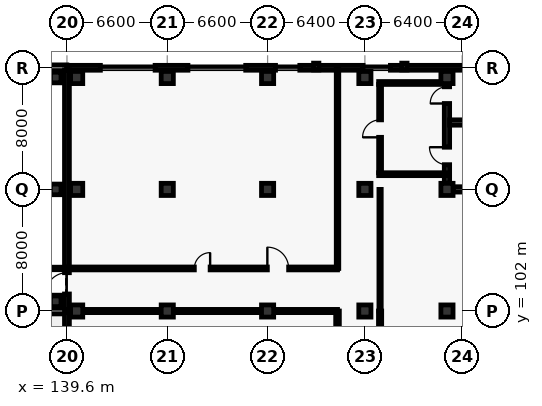
"""IFC4 building model, lengths in metres.
Left out: names, types, materials, properties, quantities, classifications, styles, units other than length and angle.
Written with IfcOpenShell. Run it as: python <this file> out.ifc"""

import sys

from ifc_helpers import new_model, si_unit, direction, frame, frame_2d, origin, origin_2d, place, context, subcontext, project, spatial, rectangle, extrude, element, fill, save


model = new_model("IFC4")
c1 = context("Model", 3, precision=1e-05, world=origin(), true_north=direction((0.0, 1.0)))
c2 = subcontext(c1, "Body", "Model", "MODEL_VIEW")
j1 = project(units=[si_unit("LENGTHUNIT", "METRE"), si_unit("PLANEANGLEUNIT", "RADIAN")], contexts=[c1])
p1 = place(None, origin())
s1 = spatial("IfcSite", under=j1, at=p1, CompositionType="ELEMENT")
p2 = place(p1, origin())
s2 = spatial("IfcBuilding", under=s1, at=p2, CompositionType="ELEMENT")
p3 = place(p2, origin())
s3 = spatial("IfcBuildingStorey", under=s2, at=p3, CompositionType="ELEMENT", Elevation=0.0)
for number, where, z_axis, x_axis in (
    (1, (138.86, 102.64, 0.0), (0.0, 0.0, 1.0), (1.0, 0.0, 0.0)),
    (2, (138.86, 110.0, 0.0), (0.0, 0.0, 1.0), (1.0, 0.0, 0.0)),
    (3, (138.86, 117.36, 0.0), (0.0, 0.0, 1.0), (1.0, 0.0, 0.0)),
):
    element("IfcColumn", number, at=place(p3, frame(where, z_axis=z_axis, x_axis=x_axis)), inside=s3, PredefinedType="COLUMN", context=c2, shape_type="SweptSolid", body=[
        extrude(rectangle(XDim=0.7, YDim=0.7, at=origin_2d()), origin(), (0.0, 0.0, 1.0), 5.4),
    ])
for number, where, z_axis, x_axis in (
    (4, (140.24, 102.0, 0.0), (0.0, 0.0, 1.0), (1.0, 0.0, 0.0)),
    (5, (140.24, 110.0, 0.0), (0.0, 0.0, 1.0), (1.0, 0.0, 0.0)),
    (6, (140.24, 117.36, 0.0), (0.0, 0.0, 1.0), (1.0, 0.0, 0.0)),
    (7, (146.2, 102.0, 0.0), (0.0, 0.0, 1.0), (1.0, 0.0, 0.0)),
    (8, (146.2, 110.0, 0.0), (0.0, 0.0, 1.0), (1.0, 0.0, 0.0)),
    (9, (146.2, 117.36, 0.0), (0.0, 0.0, 1.0), (1.0, 0.0, 0.0)),
    (10, (152.8, 102.0, 0.0), (0.0, 0.0, 1.0), (1.0, 0.0, 0.0)),
    (11, (152.8, 110.0, 0.0), (0.0, 0.0, 1.0), (1.0, 0.0, 0.0)),
    (12, (152.8, 117.36, 0.0), (0.0, 0.0, 1.0), (1.0, 0.0, 0.0)),
    (13, (159.2, 102.0, 0.0), (0.0, 0.0, 1.0), (1.0, 0.0, 0.0)),
    (14, (159.2, 110.0, 0.0), (0.0, 0.0, 1.0), (1.0, 0.0, 0.0)),
    (15, (159.2, 117.36, 0.0), (0.0, 0.0, 1.0), (1.0, 0.0, 0.0)),
    (16, (164.6, 102.0, 0.0), (0.0, 0.0, 1.0), (1.0, 0.0, 0.0)),
    (17, (164.6, 110.0, 0.0), (0.0, 0.0, 1.0), (1.0, 0.0, 0.0)),
    (18, (164.6, 117.36, 0.0), (0.0, 0.0, 1.0), (1.0, 0.0, 0.0)),
):
    element("IfcColumn", number, at=place(p3, frame(where, z_axis=z_axis, x_axis=x_axis)), inside=s3, PredefinedType="COLUMN", context=c2, shape_type="SweptSolid", body=[
        extrude(rectangle(XDim=0.8, YDim=0.8, at=origin_2d()), origin(), (0.0, 0.0, 1.0), 5.4),
    ])
for number, where, z_axis, x_axis in (
    (19, (156.0, 118.08, 0.0), (0.0, 0.0, 1.0), (0.0, 1.0, 0.0)),
    (20, (161.8, 118.08, 0.0), (0.0, 0.0, 1.0), (0.0, 1.0, 0.0)),
):
    element("IfcColumn", number, at=place(p3, frame(where, z_axis=z_axis, x_axis=x_axis)), inside=s3, PredefinedType="PILASTER", context=c2, shape_type="SweptSolid", body=[
        extrude(rectangle(XDim=0.35, YDim=0.45, at=origin_2d()), origin(), (0.0, 0.0, 1.0), 5.4),
    ])
p4 = place(p3, frame((94.8, 118.0, 0.0), z_axis=(0.0, 0.0, 1.0), x_axis=(1.0, 0.0, 0.0)))
e21 = element("IfcWall", 21, at=p4, inside=s3, PredefinedType="SOLIDWALL", context=c2, shape_type="SweptSolid", body=[
    extrude(rectangle(XDim=44.795, YDim=0.38, at=frame_2d((22.397, 0.0))), origin(), (0.0, 0.0, 1.0), 5.12),
])
p5 = place(p4, frame((0.75, 0.0, 0.9)))
e22 = element("IfcOpeningElement", 22, at=p5, cuts=e21, PredefinedType="OPENING", context=c2, shape_type="SweptSolid", body=[
    extrude(rectangle(XDim=2.6, YDim=2.35, at=frame_2d((1.3, 1.175))), frame((0.0, 0.2, 0.0), z_axis=(0.0, -1.0, 0.0), x_axis=(1.0, 0.0, 0.0)), (0.0, 0.0, 1.0), 0.4),
])
p6 = place(p4, frame((8.3, 0.0, 0.9)))
e23 = element("IfcOpeningElement", 23, at=p6, cuts=e21, PredefinedType="OPENING", context=c2, shape_type="SweptSolid", body=[
    extrude(rectangle(XDim=2.7, YDim=2.35, at=frame_2d((1.35, 1.175))), frame((0.0, 0.2, 0.0), z_axis=(0.0, -1.0, 0.0), x_axis=(1.0, 0.0, 0.0)), (0.0, 0.0, 1.0), 0.4),
])
p7 = place(p4, frame((15.9, 0.0, 0.9)))
e24 = element("IfcOpeningElement", 24, at=p7, cuts=e21, PredefinedType="OPENING", context=c2, shape_type="SweptSolid", body=[
    extrude(rectangle(XDim=2.8, YDim=2.4, at=frame_2d((1.4, 1.2))), frame((0.0, 0.2, 0.0), z_axis=(0.0, -1.0, 0.0), x_axis=(1.0, 0.0, 0.0)), (0.0, 0.0, 1.0), 0.4),
])
p8 = place(p4, frame((22.75, 0.0, 0.9)))
e25 = element("IfcOpeningElement", 25, at=p8, cuts=e21, PredefinedType="OPENING", context=c2, shape_type="SweptSolid", body=[
    extrude(rectangle(XDim=2.9, YDim=2.4, at=frame_2d((1.45, 1.2))), frame((0.0, 0.2, 0.0), z_axis=(0.0, -1.0, 0.0), x_axis=(1.0, 0.0, 0.0)), (0.0, 0.0, 1.0), 0.4),
])
p9 = place(p4, frame((30.35, 0.0, 0.9)))
e26 = element("IfcOpeningElement", 26, at=p9, cuts=e21, PredefinedType="OPENING", context=c2, shape_type="SweptSolid", body=[
    extrude(rectangle(XDim=3.0, YDim=2.45, at=frame_2d((1.5, 1.225))), frame((0.0, 0.2, 0.0), z_axis=(0.0, -1.0, 0.0), x_axis=(1.0, 0.0, 0.0)), (0.0, 0.0, 1.0), 0.4),
])
p10 = place(p4, frame((36.45, 0.0, 0.9)))
e27 = element("IfcOpeningElement", 27, at=p10, cuts=e21, PredefinedType="OPENING", context=c2, shape_type="SweptSolid", body=[
    extrude(rectangle(XDim=3.1, YDim=2.45, at=frame_2d((1.55, 1.225))), frame((0.0, 0.2, 0.0), z_axis=(0.0, -1.0, 0.0), x_axis=(1.0, 0.0, 0.0)), (0.0, 0.0, 1.0), 0.4),
])
p11 = place(p3, frame((139.5, 102.0, 0.0), z_axis=(0.0, 0.0, 1.0), x_axis=(-1.0, 0.0, 0.0)))
e28 = element("IfcWall", 28, at=p11, inside=s3, PredefinedType="SOLIDWALL", context=c2, shape_type="SweptSolid", body=[
    extrude(rectangle(XDim=44.7, YDim=0.38, at=frame_2d((22.35, 0.0))), origin(), (0.0, 0.0, 1.0), 5.12),
])
p12 = place(p11, frame((39.7, 0.0, 0.0)))
e29 = element("IfcOpeningElement", 29, at=p12, cuts=e28, PredefinedType="OPENING", context=c2, shape_type="SweptSolid", body=[
    extrude(rectangle(XDim=2.0, YDim=2.5, at=frame_2d((1.0, 1.25))), frame((0.0, 0.2, 0.0), z_axis=(0.0, -1.0, 0.0), x_axis=(1.0, 0.0, 0.0)), (0.0, 0.0, 1.0), 0.4),
])
p13 = place(p11, frame((2.2, 0.0, 0.9)))
e30 = element("IfcOpeningElement", 30, at=p13, cuts=e28, PredefinedType="OPENING", context=c2, shape_type="SweptSolid", body=[
    extrude(rectangle(XDim=3.2, YDim=2.5, at=frame_2d((1.6, 1.25))), frame((0.0, 0.2, 0.0), z_axis=(0.0, -1.0, 0.0), x_axis=(1.0, 0.0, 0.0)), (0.0, 0.0, 1.0), 0.4),
])
p14 = place(p11, frame((9.05, 0.0, 0.9)))
e31 = element("IfcOpeningElement", 31, at=p14, cuts=e28, PredefinedType="OPENING", context=c2, shape_type="SweptSolid", body=[
    extrude(rectangle(XDim=3.3, YDim=2.5, at=frame_2d((1.65, 1.25))), frame((0.0, 0.2, 0.0), z_axis=(0.0, -1.0, 0.0), x_axis=(1.0, 0.0, 0.0)), (0.0, 0.0, 1.0), 0.4),
])
p15 = place(p11, frame((15.9, 0.0, 0.9)))
e32 = element("IfcOpeningElement", 32, at=p15, cuts=e28, PredefinedType="OPENING", context=c2, shape_type="SweptSolid", body=[
    extrude(rectangle(XDim=3.4, YDim=2.55, at=frame_2d((1.7, 1.275))), frame((0.0, 0.2, 0.0), z_axis=(0.0, -1.0, 0.0), x_axis=(1.0, 0.0, 0.0)), (0.0, 0.0, 1.0), 0.4),
])
p16 = place(p11, frame((22.75, 0.0, 0.9)))
e33 = element("IfcOpeningElement", 33, at=p16, cuts=e28, PredefinedType="OPENING", context=c2, shape_type="SweptSolid", body=[
    extrude(rectangle(XDim=3.5, YDim=2.55, at=frame_2d((1.75, 1.275))), frame((0.0, 0.2, 0.0), z_axis=(0.0, -1.0, 0.0), x_axis=(1.0, 0.0, 0.0)), (0.0, 0.0, 1.0), 0.4),
])
p17 = place(p11, frame((29.6, 0.0, 0.9)))
e34 = element("IfcOpeningElement", 34, at=p17, cuts=e28, PredefinedType="OPENING", context=c2, shape_type="SweptSolid", body=[
    extrude(rectangle(XDim=3.6, YDim=2.6, at=frame_2d((1.8, 1.3))), frame((0.0, 0.2, 0.0), z_axis=(0.0, -1.0, 0.0), x_axis=(1.0, 0.0, 0.0)), (0.0, 0.0, 1.0), 0.4),
])
p18 = place(p11, frame((35.0, 0.0, 0.9)))
e35 = element("IfcOpeningElement", 35, at=p18, cuts=e28, PredefinedType="OPENING", context=c2, shape_type="SweptSolid", body=[
    extrude(rectangle(XDim=3.8, YDim=2.6, at=frame_2d((1.9, 1.3))), frame((0.0, 0.2, 0.0), z_axis=(0.0, -1.0, 0.0), x_axis=(1.0, 0.0, 0.0)), (0.0, 0.0, 1.0), 0.4),
])
p19 = place(p3, frame((139.6, 118.0, 0.0), z_axis=(0.0, 0.0, 1.0), x_axis=(1.0, 0.0, 0.0)))
e36 = element("IfcWall", 36, at=p19, inside=s3, PredefinedType="SOLIDWALL", context=c2, shape_type="SweptSolid", body=[
    extrude(rectangle(XDim=32.4, YDim=0.32, at=frame_2d((16.2, 0.0))), origin(), (0.0, 0.0, 1.0), 5.14),
])
p20 = place(p19, frame((28.5, 0.0, 0.0)))
e37 = element("IfcOpeningElement", 37, at=p20, cuts=e36, PredefinedType="OPENING", context=c2, shape_type="SweptSolid", body=[
    extrude(rectangle(XDim=2.0, YDim=2.5, at=frame_2d((1.0, 1.25))), frame((0.0, 0.17, 0.0), z_axis=(0.0, -1.0, 0.0), x_axis=(1.0, 0.0, 0.0)), (0.0, 0.0, 1.0), 0.34),
])
p21 = place(p19, frame((2.2, 0.0, 0.9)))
e38 = element("IfcOpeningElement", 38, at=p21, cuts=e36, PredefinedType="OPENING", context=c2, shape_type="SweptSolid", body=[
    extrude(rectangle(XDim=3.6, YDim=2.6, at=frame_2d((1.8, 1.3))), frame((0.0, 0.17, 0.0), z_axis=(0.0, -1.0, 0.0), x_axis=(1.0, 0.0, 0.0)), (0.0, 0.0, 1.0), 0.34),
])
p22 = place(p19, frame((7.96, 0.0, 0.9)))
e39 = element("IfcOpeningElement", 39, at=p22, cuts=e36, PredefinedType="OPENING", context=c2, shape_type="SweptSolid", body=[
    extrude(rectangle(XDim=3.8, YDim=2.6, at=frame_2d((1.9, 1.3))), frame((0.0, 0.17, 0.0), z_axis=(0.0, -1.0, 0.0), x_axis=(1.0, 0.0, 0.0)), (0.0, 0.0, 1.0), 0.34),
])
p23 = place(p19, frame((13.72, 0.0, 0.9)))
e40 = element("IfcOpeningElement", 40, at=p23, cuts=e36, PredefinedType="OPENING", context=c2, shape_type="SweptSolid", body=[
    extrude(rectangle(XDim=1.6, YDim=1.65, at=frame_2d((0.8, 0.825))), frame((0.0, 0.17, 0.0), z_axis=(0.0, -1.0, 0.0), x_axis=(1.0, 0.0, 0.0)), (0.0, 0.0, 1.0), 0.34),
])
p24 = place(p19, frame((19.48, 0.0, 0.9)))
e41 = element("IfcOpeningElement", 41, at=p24, cuts=e36, PredefinedType="OPENING", context=c2, shape_type="SweptSolid", body=[
    extrude(rectangle(XDim=1.8, YDim=1.65, at=frame_2d((0.9, 0.825))), frame((0.0, 0.17, 0.0), z_axis=(0.0, -1.0, 0.0), x_axis=(1.0, 0.0, 0.0)), (0.0, 0.0, 1.0), 0.34),
])
p25 = place(p3, frame((139.6, 71.74, 0.0), z_axis=(0.0, 0.0, 1.0), x_axis=(0.0, 1.0, 0.0)))
e42 = element("IfcWall", 42, at=p25, inside=s3, PredefinedType="SOLIDWALL", context=c2, shape_type="SweptSolid", body=[
    extrude(rectangle(XDim=46.12, YDim=0.32, at=frame_2d((23.06, 0.0))), origin(), (0.0, 0.0, 1.0), 4.29),
])
p26 = place(p25, frame((31.38, 0.0, 0.0)))
e43 = element("IfcOpeningElement", 43, at=p26, cuts=e42, PredefinedType="OPENING", context=c2, shape_type="SweptSolid", body=[
    extrude(rectangle(XDim=1.4, YDim=2.25, at=frame_2d((0.7, 1.125))), frame((0.0, 0.17, 0.0), z_axis=(0.0, -1.0, 0.0), x_axis=(1.0, 0.0, 0.0)), (0.0, 0.0, 1.0), 0.34),
])
p27 = place(p3, frame((165.002, 110.0, 0.0), z_axis=(0.0, 0.0, 1.0), x_axis=(1.0, 0.0, 0.0)))
e44 = element("IfcWall", 44, at=p27, inside=s3, PredefinedType="SHEAR", context=c2, shape_type="SweptSolid", body=[
    extrude(rectangle(XDim=7.173, YDim=0.35, at=frame_2d((3.586, 0.0))), origin(), (0.0, 0.0, 1.0), 5.14),
])
p28 = place(p3, frame((164.6, 110.402, 0.0), z_axis=(0.0, 0.0, 1.0), x_axis=(0.0, 1.0, 0.0)))
e45 = element("IfcWall", 45, at=p28, inside=s3, PredefinedType="SHEAR", context=c2, shape_type="SweptSolid", body=[
    extrude(rectangle(XDim=7.423, YDim=0.35, at=frame_2d((3.711, 0.0))), origin(), (0.0, 0.0, 1.0), 5.14),
])
p29 = place(p28, frame((5.248, 0.0, 0.0)))
e46 = element("IfcOpeningElement", 46, at=p29, cuts=e45, PredefinedType="OPENING", context=c2, shape_type="SweptSolid", body=[
    extrude(rectangle(XDim=1.1, YDim=2.15, at=frame_2d((0.55, 1.075))), frame((0.0, 0.185, 0.0), z_axis=(0.0, -1.0, 0.0), x_axis=(1.0, 0.0, 0.0)), (0.0, 0.0, 1.0), 0.37),
])
p30 = place(p28, frame((1.223, 0.0, 0.0)))
e47 = element("IfcOpeningElement", 47, at=p30, cuts=e45, PredefinedType="OPENING", context=c2, shape_type="SweptSolid", body=[
    extrude(rectangle(XDim=1.15, YDim=2.2, at=frame_2d((0.575, 1.1))), frame((0.0, 0.185, 0.0), z_axis=(0.0, -1.0, 0.0), x_axis=(1.0, 0.0, 0.0)), (0.0, 0.0, 1.0), 0.37),
])
p31 = place(p3, frame((164.775, 114.4, 0.0), z_axis=(0.0, 0.0, 1.0), x_axis=(1.0, 0.0, 0.0)))
e48 = element("IfcWall", 48, at=p31, inside=s3, PredefinedType="SHEAR", context=c2, shape_type="SweptSolid", body=[
    extrude(rectangle(XDim=7.05, YDim=0.35, at=frame_2d((3.525, 0.0))), origin(), (0.0, 0.0, 1.0), 5.14),
])
p32 = place(p3, frame((160.105, 111.0, 0.0), z_axis=(0.0, 0.0, 1.0), x_axis=(1.0, 0.0, 0.0)))
e49 = element("IfcWall", 49, at=p32, inside=s3, PredefinedType="PARTITIONING", context=c2, shape_type="SweptSolid", body=[
    extrude(rectangle(XDim=4.495, YDim=0.19, at=frame_2d((2.248, 0.0))), origin(), (0.0, 0.0, 1.0), 5.14),
])
p33 = place(p3, frame((160.105, 117.0, 0.0), z_axis=(0.0, 0.0, 1.0), x_axis=(1.0, 0.0, 0.0)))
e50 = element("IfcWall", 50, at=p33, inside=s3, PredefinedType="PARTITIONING", context=c2, shape_type="SweptSolid", body=[
    extrude(rectangle(XDim=4.093, YDim=0.19, at=frame_2d((2.046, 0.0))), origin(), (0.0, 0.0, 1.0), 4.49),
])
p34 = place(p3, frame((160.2, 111.095, 0.0), z_axis=(0.0, 0.0, 1.0), x_axis=(0.0, 1.0, 0.0)))
e51 = element("IfcWall", 51, at=p34, inside=s3, PredefinedType="PARTITIONING", context=c2, shape_type="SweptSolid", body=[
    extrude(rectangle(XDim=5.81, YDim=0.19, at=frame_2d((2.905, 0.0))), origin(), (0.0, 0.0, 1.0), 5.14),
])
p35 = place(p34, frame((2.33, 0.0, 0.0)))
e52 = element("IfcOpeningElement", 52, at=p35, cuts=e51, PredefinedType="OPENING", context=c2, shape_type="SweptSolid", body=[
    extrude(rectangle(XDim=1.15, YDim=2.2, at=frame_2d((0.575, 1.1))), frame((0.0, 0.105, 0.0), z_axis=(0.0, -1.0, 0.0), x_axis=(1.0, 0.0, 0.0)), (0.0, 0.0, 1.0), 0.21),
])
p36 = place(p3, frame((124.8, 104.8, 0.0), z_axis=(0.0, 0.0, 1.0), x_axis=(1.0, 0.0, 0.0)))
e53 = element("IfcWall", 53, at=p36, inside=s3, PredefinedType="PARTITIONING", context=c2, shape_type="SweptSolid", body=[
    extrude(rectangle(XDim=14.7, YDim=0.165, at=frame_2d((7.35, 0.0))), origin(), (0.0, 0.0, 1.0), 5.12),
])
p37 = place(p36, frame((6.88, 0.0, 0.0)))
e54 = element("IfcOpeningElement", 54, at=p37, cuts=e53, PredefinedType="OPENING", context=c2, shape_type="SweptSolid", body=[
    extrude(rectangle(XDim=0.94, YDim=2.15, at=frame_2d((0.47, 1.075))), frame((0.0, 0.093, 0.0), z_axis=(0.0, -1.0, 0.0), x_axis=(1.0, 0.0, 0.0)), (0.0, 0.0, 1.0), 0.185),
])
p38 = place(p3, frame((157.4, 102.0, 0.0), z_axis=(0.0, 0.0, 1.0), x_axis=(-1.0, 0.0, 0.0)))
e55 = element("IfcWall", 55, at=p38, inside=s3, PredefinedType="PARTITIONING", context=c2, shape_type="SweptSolid", body=[
    extrude(rectangle(XDim=17.8, YDim=0.21, at=frame_2d((8.9, 0.0))), origin(), (0.0, 0.0, 1.0), 4.49),
])
p39 = place(p3, frame((139.6, 104.8, 0.0), z_axis=(0.0, 0.0, 1.0), x_axis=(1.0, 0.0, 0.0)))
e56 = element("IfcWall", 56, at=p39, inside=s3, PredefinedType="PARTITIONING", context=c2, shape_type="SweptSolid", body=[
    extrude(rectangle(XDim=17.8, YDim=0.19, at=frame_2d((8.9, 0.0))), origin(), (0.0, 0.0, 1.0), 5.14),
])
p40 = place(p39, frame((8.38, 0.0, 0.0)))
e57 = element("IfcOpeningElement", 57, at=p40, cuts=e56, PredefinedType="OPENING", context=c2, shape_type="SweptSolid", body=[
    extrude(rectangle(XDim=1.04, YDim=2.2, at=frame_2d((0.52, 1.1))), frame((0.0, 0.105, 0.0), z_axis=(0.0, -1.0, 0.0), x_axis=(1.0, 0.0, 0.0)), (0.0, 0.0, 1.0), 0.21),
])
p41 = place(p39, frame((13.184, 0.0, 0.0)))
e58 = element("IfcOpeningElement", 58, at=p41, cuts=e56, PredefinedType="OPENING", context=c2, shape_type="SweptSolid", body=[
    extrude(rectangle(XDim=1.4, YDim=2.25, at=frame_2d((0.7, 1.125))), frame((0.0, 0.105, 0.0), z_axis=(0.0, -1.0, 0.0), x_axis=(1.0, 0.0, 0.0)), (0.0, 0.0, 1.0), 0.21),
])
p42 = place(p3, frame((157.4, 104.8, 0.0), z_axis=(0.0, 0.0, 1.0), x_axis=(0.0, 1.0, 0.0)))
e59 = element("IfcWall", 59, at=p42, inside=s3, PredefinedType="PARTITIONING", context=c2, shape_type="SweptSolid", body=[
    extrude(rectangle(XDim=13.2, YDim=0.165, at=frame_2d((6.6, 0.0))), origin(), (0.0, 0.0, 1.0), 5.14),
])
p43 = place(p3, frame((160.2, 110.0, 0.0), z_axis=(0.0, 0.0, 1.0), x_axis=(0.0, -1.0, 0.0)))
e60 = element("IfcWall", 60, at=p43, inside=s3, PredefinedType="PARTITIONING", context=c2, shape_type="SweptSolid", body=[
    extrude(rectangle(XDim=8.0, YDim=0.15, at=frame_2d((4.0, 0.0))), origin(), (0.0, 0.0, 1.0), 5.14),
])
p44 = place(p3, frame((157.4, 71.6, 0.0), z_axis=(0.0, 0.0, 1.0), x_axis=(0.0, 1.0, 0.0)))
e61 = element("IfcWall", 61, at=p44, inside=s3, PredefinedType="PARTITIONING", context=c2, shape_type="SweptSolid", body=[
    extrude(rectangle(XDim=30.4, YDim=0.24, at=frame_2d((15.2, 0.0))), origin(), (0.0, 0.0, 1.0), 5.14),
])
p45 = place(p44, frame((14.69, 0.0, 0.0)))
e62 = element("IfcOpeningElement", 62, at=p45, cuts=e61, PredefinedType="OPENING", context=c2, shape_type="SweptSolid", body=[
    extrude(rectangle(XDim=1.02, YDim=2.1, at=frame_2d((0.51, 1.05))), frame((0.0, 0.13, 0.0), z_axis=(0.0, -1.0, 0.0), x_axis=(1.0, 0.0, 0.0)), (0.0, 0.0, 1.0), 0.26),
])
p46 = place(p44, frame((23.012, 0.0, 0.0)))
e63 = element("IfcOpeningElement", 63, at=p46, cuts=e61, PredefinedType="OPENING", context=c2, shape_type="SweptSolid", body=[
    extrude(rectangle(XDim=1.4, YDim=2.25, at=frame_2d((0.7, 1.125))), frame((0.0, 0.13, 0.0), z_axis=(0.0, -1.0, 0.0), x_axis=(1.0, 0.0, 0.0)), (0.0, 0.0, 1.0), 0.26),
])
p47 = place(p3, frame((160.2, 102.0, 0.0), z_axis=(0.0, 0.0, 1.0), x_axis=(0.0, -1.0, 0.0)))
e64 = element("IfcWall", 64, at=p47, inside=s3, PredefinedType="PARTITIONING", context=c2, shape_type="SweptSolid", body=[
    extrude(rectangle(XDim=22.4, YDim=0.21, at=frame_2d((11.2, 0.0))), origin(), (0.0, 0.0, 1.0), 5.14),
])
p48 = place(p47, frame((10.71, 0.0, 0.0)))
e65 = element("IfcOpeningElement", 65, at=p48, cuts=e64, PredefinedType="OPENING", context=c2, shape_type="SweptSolid", body=[
    extrude(rectangle(XDim=0.98, YDim=2.1, at=frame_2d((0.49, 1.05))), frame((0.0, 0.115, 0.0), z_axis=(0.0, -1.0, 0.0), x_axis=(1.0, 0.0, 0.0)), (0.0, 0.0, 1.0), 0.23),
])
p49 = place(p47, frame((16.772, 0.0, 0.0)))
e66 = element("IfcOpeningElement", 66, at=p49, cuts=e64, PredefinedType="OPENING", context=c2, shape_type="SweptSolid", body=[
    extrude(rectangle(XDim=1.4, YDim=2.25, at=frame_2d((0.7, 1.125))), frame((0.0, 0.115, 0.0), z_axis=(0.0, -1.0, 0.0), x_axis=(1.0, 0.0, 0.0)), (0.0, 0.0, 1.0), 0.23),
])
p50 = place(p21, origin())
e67 = element("IfcWindow", 67, at=p50, inside=s3, PartitioningType="SINGLE_PANEL", PredefinedType="WINDOW", context=c2, shape_type="SweptSolid", body=[
    extrude(rectangle(XDim=3.6, YDim=2.6, at=frame_2d((1.8, 1.3))), frame((0.0, 0.03, 0.0), z_axis=(0.0, -1.0, 0.0), x_axis=(1.0, 0.0, 0.0)), (0.0, 0.0, 1.0), 0.06),
])
fill(e38, e67)
p51 = place(p22, origin())
e68 = element("IfcWindow", 68, at=p51, inside=s3, PartitioningType="SINGLE_PANEL", PredefinedType="WINDOW", context=c2, shape_type="SweptSolid", body=[
    extrude(rectangle(XDim=3.8, YDim=2.6, at=frame_2d((1.9, 1.3))), frame((0.0, 0.03, 0.0), z_axis=(0.0, -1.0, 0.0), x_axis=(1.0, 0.0, 0.0)), (0.0, 0.0, 1.0), 0.06),
])
fill(e39, e68)
p52 = place(p23, origin())
e69 = element("IfcWindow", 69, at=p52, inside=s3, PartitioningType="SINGLE_PANEL", PredefinedType="WINDOW", context=c2, shape_type="SweptSolid", body=[
    extrude(rectangle(XDim=1.6, YDim=1.65, at=frame_2d((0.8, 0.825))), frame((0.0, 0.03, 0.0), z_axis=(0.0, -1.0, 0.0), x_axis=(1.0, 0.0, 0.0)), (0.0, 0.0, 1.0), 0.06),
])
fill(e40, e69)
p53 = place(p24, origin())
e70 = element("IfcWindow", 70, at=p53, inside=s3, PartitioningType="SINGLE_PANEL", PredefinedType="WINDOW", context=c2, shape_type="SweptSolid", body=[
    extrude(rectangle(XDim=1.8, YDim=1.65, at=frame_2d((0.9, 0.825))), frame((0.0, 0.03, 0.0), z_axis=(0.0, -1.0, 0.0), x_axis=(1.0, 0.0, 0.0)), (0.0, 0.0, 1.0), 0.06),
])
fill(e41, e70)
p54 = place(p29, origin())
e71 = element("IfcDoor", 71, at=p54, inside=s3, OperationType="SINGLE_SWING_LEFT", PredefinedType="DOOR", context=c2, shape_type="SweptSolid", body=[
    extrude(rectangle(XDim=1.1, YDim=2.15, at=frame_2d((0.55, 1.075))), frame((0.0, 0.025, 0.0), z_axis=(0.0, -1.0, 0.0), x_axis=(1.0, 0.0, 0.0)), (0.0, 0.0, 1.0), 0.05),
])
fill(e46, e71)
p55 = place(p30, origin())
e72 = element("IfcDoor", 72, at=p55, inside=s3, OperationType="SINGLE_SWING_RIGHT", PredefinedType="DOOR", context=c2, shape_type="SweptSolid", body=[
    extrude(rectangle(XDim=1.15, YDim=2.2, at=frame_2d((0.575, 1.1))), frame((0.0, 0.025, 0.0), z_axis=(0.0, -1.0, 0.0), x_axis=(1.0, 0.0, 0.0)), (0.0, 0.0, 1.0), 0.05),
])
fill(e47, e72)
p56 = place(p35, origin())
e73 = element("IfcDoor", 73, at=p56, inside=s3, OperationType="SINGLE_SWING_LEFT", PredefinedType="DOOR", context=c2, shape_type="SweptSolid", body=[
    extrude(rectangle(XDim=1.15, YDim=2.2, at=frame_2d((0.575, 1.1))), frame((0.0, 0.025, 0.0), z_axis=(0.0, -1.0, 0.0), x_axis=(1.0, 0.0, 0.0)), (0.0, 0.0, 1.0), 0.05),
])
fill(e52, e73)
p57 = place(p26, origin())
e74 = element("IfcDoor", 74, at=p57, inside=s3, OperationType="SINGLE_SWING_LEFT", PredefinedType="DOOR", context=c2, shape_type="SweptSolid", body=[
    extrude(rectangle(XDim=1.4, YDim=2.25, at=frame_2d((0.7, 1.125))), frame((0.0, 0.025, 0.0), z_axis=(0.0, -1.0, 0.0), x_axis=(1.0, 0.0, 0.0)), (0.0, 0.0, 1.0), 0.05),
])
fill(e43, e74)
p58 = place(p40, origin())
e75 = element("IfcDoor", 75, at=p58, inside=s3, OperationType="SINGLE_SWING_RIGHT", PredefinedType="DOOR", context=c2, shape_type="SweptSolid", body=[
    extrude(rectangle(XDim=1.04, YDim=2.2, at=frame_2d((0.52, 1.1))), frame((0.0, 0.025, 0.0), z_axis=(0.0, -1.0, 0.0), x_axis=(1.0, 0.0, 0.0)), (0.0, 0.0, 1.0), 0.05),
])
fill(e57, e75)
p59 = place(p41, origin())
e76 = element("IfcDoor", 76, at=p59, inside=s3, OperationType="SINGLE_SWING_LEFT", PredefinedType="DOOR", context=c2, shape_type="SweptSolid", body=[
    extrude(rectangle(XDim=1.4, YDim=2.25, at=frame_2d((0.7, 1.125))), frame((0.0, 0.025, 0.0), z_axis=(0.0, -1.0, 0.0), x_axis=(1.0, 0.0, 0.0)), (0.0, 0.0, 1.0), 0.05),
])
fill(e58, e76)
save(model, sys.argv[1])
